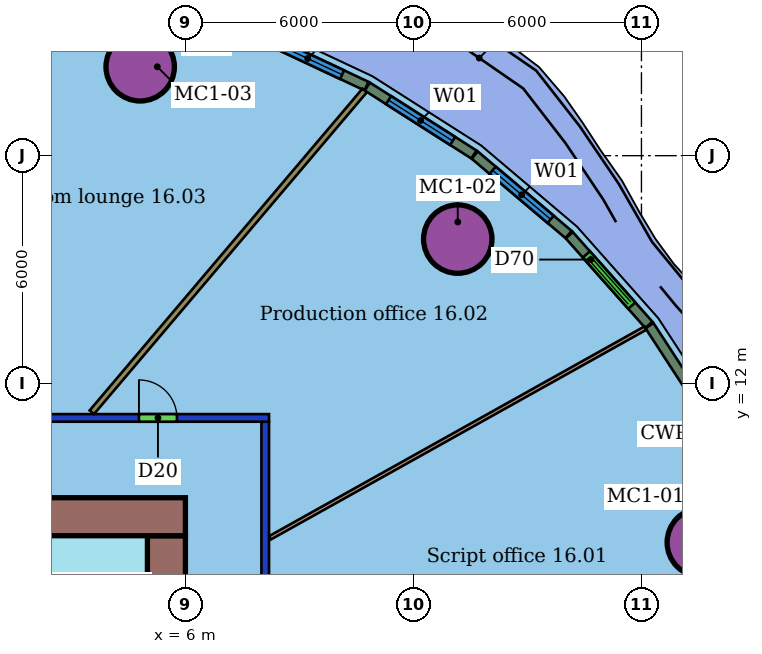
"""IFC4 building model, lengths in metres.
Left out: names, types, materials, properties, quantities, classifications, styles, units other than length and angle.
Written with IfcOpenShell. Run it as: python <this file> out.ifc"""

import sys

from ifc_helpers import new_model, si_unit, direction, frame, frame_2d, origin, origin_2d, place, context, subcontext, project, spatial, rectangle, hollow_circle, extrude, element, fill, save


model = new_model("IFC4")
c1 = context("Model", 3, precision=1e-05, world=origin(), true_north=direction((0.0, 1.0)))
c2 = subcontext(c1, "Body", "Model", "MODEL_VIEW")
j1 = project(units=[si_unit("LENGTHUNIT", "METRE"), si_unit("PLANEANGLEUNIT", "RADIAN")], contexts=[c1])
p1 = place(None, origin())
s1 = spatial("IfcSite", under=j1, at=p1, CompositionType="ELEMENT")
p2 = place(p1, origin())
s2 = spatial("IfcBuilding", under=s1, at=p2, CompositionType="ELEMENT")
p3 = place(p2, frame((0.0, 0.0, 76.7)))
s3 = spatial("IfcBuildingStorey", under=s2, at=p3, CompositionType="ELEMENT", Elevation=76.7)
for number, where, z_axis, x_axis in (
    (1, (19.575, 7.824, 0.0), (0.0, 0.0, 1.0), (1.0, 0.0, 0.0)),
    (2, (13.166, 15.805, 0.0), (0.0, 0.0, 1.0), (1.0, 0.0, 0.0)),
    (3, (4.81, 20.339, 0.0), (0.0, 0.0, 1.0), (1.0, 0.0, 0.0)),
):
    element("IfcColumn", number, at=place(p3, frame(where, z_axis=z_axis, x_axis=x_axis)), inside=s3, PredefinedType="COLUMN", context=c2, shape_type="SweptSolid", body=[
        extrude(hollow_circle(Radius=0.9, WallThickness=0.06, at=origin_2d()), origin(), (0.0, 0.0, 1.0), 3.55),
    ])
p4 = place(p3, frame((-20.2, 11.1, 0.0), z_axis=(0.0, 0.0, 1.0), x_axis=(1.0, 0.0, 0.0)))
e4 = element("IfcWall", 4, at=p4, inside=s3, PredefinedType="PARTITIONING", context=c2, shape_type="SweptSolid", body=[
    extrude(rectangle(XDim=28.4, YDim=0.2, at=frame_2d((14.2, 0.0))), origin(), (0.0, 0.0, 1.0), 2.85),
])
p5 = place(p4, frame((24.977, 0.0, 0.0)))
e5 = element("IfcOpeningElement", 5, at=p5, cuts=e4, PredefinedType="OPENING", context=c2, shape_type="SweptSolid", body=[
    extrude(rectangle(XDim=1.0, YDim=2.1, at=frame_2d((0.5, 1.05))), frame((0.0, 0.11, 0.0), z_axis=(0.0, -1.0, 0.0), x_axis=(1.0, 0.0, 0.0)), (0.0, 0.0, 1.0), 0.22),
])
p6 = place(p4, frame((19.076, 0.0, 0.0)))
e6 = element("IfcOpeningElement", 6, at=p6, cuts=e4, PredefinedType="OPENING", context=c2, shape_type="SweptSolid", body=[
    extrude(rectangle(XDim=1.5, YDim=2.1, at=frame_2d((0.75, 1.05))), frame((0.0, 0.11, 0.0), z_axis=(0.0, -1.0, 0.0), x_axis=(1.0, 0.0, 0.0)), (0.0, 0.0, 1.0), 0.22),
])
p7 = place(p4, frame((15.051, 0.0, 0.0)))
e7 = element("IfcOpeningElement", 7, at=p7, cuts=e4, PredefinedType="OPENING", context=c2, shape_type="SweptSolid", body=[
    extrude(rectangle(XDim=0.9, YDim=2.1, at=frame_2d((0.45, 1.05))), frame((0.0, 0.11, 0.0), z_axis=(0.0, -1.0, 0.0), x_axis=(1.0, 0.0, 0.0)), (0.0, 0.0, 1.0), 0.22),
])
p8 = place(p4, frame((8.231, 0.0, 0.0)))
e8 = element("IfcOpeningElement", 8, at=p8, cuts=e4, PredefinedType="OPENING", context=c2, shape_type="SweptSolid", body=[
    extrude(rectangle(XDim=1.2, YDim=2.1, at=frame_2d((0.6, 1.05))), frame((0.0, 0.11, 0.0), z_axis=(0.0, -1.0, 0.0), x_axis=(1.0, 0.0, 0.0)), (0.0, 0.0, 1.0), 0.22),
])
p9 = place(p3, frame((8.1, 11.0, 0.0), z_axis=(0.0, 0.0, 1.0), x_axis=(0.0, -1.0, 0.0)))
e9 = element("IfcWall", 9, at=p9, inside=s3, PredefinedType="PARTITIONING", context=c2, shape_type="SweptSolid", body=[
    extrude(rectangle(XDim=22.0, YDim=0.2, at=frame_2d((11.0, 0.0))), origin(), (0.0, 0.0, 1.0), 2.85),
])
p10 = place(p9, frame((5.898, 0.0, 0.0)))
e10 = element("IfcOpeningElement", 10, at=p10, cuts=e9, PredefinedType="OPENING", context=c2, shape_type="SweptSolid", body=[
    extrude(rectangle(XDim=1.0, YDim=2.1, at=frame_2d((0.5, 1.05))), frame((0.0, 0.11, 0.0), z_axis=(0.0, -1.0, 0.0), x_axis=(1.0, 0.0, 0.0)), (0.0, 0.0, 1.0), 0.22),
])
p11 = place(p9, frame((16.7, 0.0, 0.0)))
e11 = element("IfcOpeningElement", 11, at=p11, cuts=e9, PredefinedType="OPENING", context=c2, shape_type="SweptSolid", body=[
    extrude(rectangle(XDim=1.5, YDim=2.1, at=frame_2d((0.75, 1.05))), frame((0.0, 0.11, 0.0), z_axis=(0.0, -1.0, 0.0), x_axis=(1.0, 0.0, 0.0)), (0.0, 0.0, 1.0), 0.22),
])
p12 = place(p9, frame((12.749, 0.0, 0.0)))
e12 = element("IfcOpeningElement", 12, at=p12, cuts=e9, PredefinedType="OPENING", context=c2, shape_type="SweptSolid", body=[
    extrude(rectangle(XDim=1.1, YDim=2.1, at=frame_2d((0.55, 1.05))), frame((0.0, 0.11, 0.0), z_axis=(0.0, -1.0, 0.0), x_axis=(1.0, 0.0, 0.0)), (0.0, 0.0, 1.0), 0.22),
])
p13 = place(p9, frame((9.026, 0.0, 0.0)))
e13 = element("IfcOpeningElement", 13, at=p13, cuts=e9, PredefinedType="OPENING", context=c2, shape_type="SweptSolid", body=[
    extrude(rectangle(XDim=1.5, YDim=2.1, at=frame_2d((0.75, 1.05))), frame((0.0, 0.11, 0.0), z_axis=(0.0, -1.0, 0.0), x_axis=(1.0, 0.0, 0.0)), (0.0, 0.0, 1.0), 0.22),
])
p14 = place(p3, frame((18.104, 13.463, 0.0), z_axis=(0.0, 0.0, 1.0), x_axis=(-0.873053971866, -0.4876235866, 0.0)))
e14 = element("IfcWall", 14, at=p14, inside=s3, PredefinedType="PARTITIONING", context=c2, shape_type="SweptSolid", body=[
    extrude(rectangle(XDim=11.317, YDim=0.1, at=frame_2d((5.658, 0.0))), origin(), (0.0, 0.0, 1.0), 3.55),
])
p15 = place(p3, frame((10.716, 19.716, 0.0), z_axis=(0.0, 0.0, 1.0), x_axis=(-0.646692205785, -0.762751067503, 0.0)))
e15 = element("IfcWall", 15, at=p15, inside=s3, PredefinedType="PARTITIONING", context=c2, shape_type="SweptSolid", body=[
    extrude(rectangle(XDim=11.101, YDim=0.15, at=frame_2d((5.55, 0.0))), origin(), (0.0, 0.0, 1.0), 3.55),
])
p16 = place(p3, frame((19.871, 10.978, 0.0), z_axis=(0.0, 0.0, 1.0), x_axis=(-0.545574882471, 0.838062078618, 0.0)))
e16 = element("IfcWall", 16, at=p16, inside=s3, PredefinedType="SOLIDWALL", context=c2, shape_type="SweptSolid", body=[
    extrude(rectangle(XDim=3.042, YDim=0.25, at=frame_2d((1.521, 0.0))), origin(), (0.0, 0.0, 1.0), 3.15),
])
p17 = place(p3, frame((18.195, 13.549, 0.0), z_axis=(0.0, 0.0, 1.0), x_axis=(-0.663940867432, 0.747785079119, 0.0)))
e17 = element("IfcWall", 17, at=p17, inside=s3, PredefinedType="SOLIDWALL", context=c2, shape_type="SweptSolid", body=[
    extrude(rectangle(XDim=3.154, YDim=0.25, at=frame_2d((1.577, 0.0))), origin(), (0.0, 0.0, 1.0), 3.15),
])
p18 = place(p17, frame((0.677, 0.0, 0.0)))
e18 = element("IfcOpeningElement", 18, at=p18, cuts=e17, PredefinedType="OPENING", context=c2, shape_type="SweptSolid", body=[
    extrude(rectangle(XDim=1.8, YDim=2.4, at=frame_2d((0.9, 1.2))), frame((0.0, 0.135, 0.0), z_axis=(0.0, -1.0, 0.0), x_axis=(1.0, 0.0, 0.0)), (0.0, 0.0, 1.0), 0.27),
])
p19 = place(p3, frame((16.083, 15.925, 0.0), z_axis=(0.0, 0.0, 1.0), x_axis=(-0.763314755693, 0.646026767047, 0.0)))
e19 = element("IfcWall", 19, at=p19, inside=s3, PredefinedType="SOLIDWALL", context=c2, shape_type="SweptSolid", body=[
    extrude(rectangle(XDim=3.237, YDim=0.25, at=frame_2d((1.618, 0.0))), origin(), (0.0, 0.0, 1.0), 3.15),
])
p20 = place(p19, frame((0.618, 0.0, 0.8)))
e20 = element("IfcOpeningElement", 20, at=p20, cuts=e19, PredefinedType="OPENING", context=c2, shape_type="SweptSolid", body=[
    extrude(rectangle(XDim=2.0, YDim=2.2, at=frame_2d((1.0, 1.1))), frame((0.0, 0.135, 0.0), z_axis=(0.0, -1.0, 0.0), x_axis=(1.0, 0.0, 0.0)), (0.0, 0.0, 1.0), 0.27),
])
p21 = place(p3, frame((13.592, 18.031, 0.0), z_axis=(0.0, 0.0, 1.0), x_axis=(-0.843428771265, 0.537241014632, 0.0)))
e21 = element("IfcWall", 21, at=p21, inside=s3, PredefinedType="SOLIDWALL", context=c2, shape_type="SweptSolid", body=[
    extrude(rectangle(XDim=3.327, YDim=0.25, at=frame_2d((1.664, 0.0))), origin(), (0.0, 0.0, 1.0), 3.15),
])
p22 = place(p21, frame((0.664, 0.0, 0.8)))
e22 = element("IfcOpeningElement", 22, at=p22, cuts=e21, PredefinedType="OPENING", context=c2, shape_type="SweptSolid", body=[
    extrude(rectangle(XDim=2.0, YDim=2.2, at=frame_2d((1.0, 1.1))), frame((0.0, 0.135, 0.0), z_axis=(0.0, -1.0, 0.0), x_axis=(1.0, 0.0, 0.0)), (0.0, 0.0, 1.0), 0.27),
])
p23 = place(p3, frame((10.765, 19.83, 0.0), z_axis=(0.0, 0.0, 1.0), x_axis=(-0.905237504744, 0.424905942538, 0.0)))
e23 = element("IfcWall", 23, at=p23, inside=s3, PredefinedType="SOLIDWALL", context=c2, shape_type="SweptSolid", body=[
    extrude(rectangle(XDim=3.418, YDim=0.25, at=frame_2d((1.709, 0.0))), origin(), (0.0, 0.0, 1.0), 3.15),
])
p24 = place(p23, frame((0.709, 0.0, 0.8)))
e24 = element("IfcOpeningElement", 24, at=p24, cuts=e23, PredefinedType="OPENING", context=c2, shape_type="SweptSolid", body=[
    extrude(rectangle(XDim=2.0, YDim=2.2, at=frame_2d((1.0, 1.1))), frame((0.0, 0.135, 0.0), z_axis=(0.0, -1.0, 0.0), x_axis=(1.0, 0.0, 0.0)), (0.0, 0.0, 1.0), 0.27),
])
p25 = place(p3, frame((6.0, 8.5, 0.0), z_axis=(0.0, 0.0, 1.0), x_axis=(-1.0, 0.0, 0.0)))
e25 = element("IfcWall", 25, at=p25, inside=s3, PredefinedType="SHEAR", context=c2, shape_type="SweptSolid", body=[
    extrude(rectangle(XDim=12.0, YDim=1.0, at=frame_2d((6.0, 0.0))), origin(), (0.0, 0.0, 1.0), 3.4),
])
p26 = place(p25, frame((5.6, 0.0, 0.0)))
e26 = element("IfcOpeningElement", 26, at=p26, cuts=e25, PredefinedType="OPENING", context=c2, shape_type="SweptSolid", body=[
    extrude(rectangle(XDim=1.2, YDim=2.1, at=frame_2d((0.6, 1.05))), frame((0.0, 0.51, 0.0), z_axis=(0.0, -1.0, 0.0), x_axis=(1.0, 0.0, 0.0)), (0.0, 0.0, 1.0), 1.02),
])
p27 = place(p3, frame((5.5, -8.0, 0.0), z_axis=(0.0, 0.0, 1.0), x_axis=(0.0, 1.0, 0.0)))
e27 = element("IfcWall", 27, at=p27, inside=s3, PredefinedType="SHEAR", context=c2, shape_type="SweptSolid", body=[
    extrude(rectangle(XDim=16.0, YDim=1.0, at=frame_2d((8.0, 0.0))), origin(), (0.0, 0.0, 1.0), 3.4),
])
p28 = place(p27, frame((2.9, 0.0, 0.0)))
e28 = element("IfcOpeningElement", 28, at=p28, cuts=e27, PredefinedType="OPENING", context=c2, shape_type="SweptSolid", body=[
    extrude(rectangle(XDim=1.2, YDim=2.1, at=frame_2d((0.6, 1.05))), frame((0.0, 0.51, 0.0), z_axis=(0.0, -1.0, 0.0), x_axis=(1.0, 0.0, 0.0)), (0.0, 0.0, 1.0), 1.02),
])
p29 = place(p27, frame((11.9, 0.0, 0.0)))
e29 = element("IfcOpeningElement", 29, at=p29, cuts=e27, PredefinedType="OPENING", context=c2, shape_type="SweptSolid", body=[
    extrude(rectangle(XDim=1.2, YDim=2.1, at=frame_2d((0.6, 1.05))), frame((0.0, 0.51, 0.0), z_axis=(0.0, -1.0, 0.0), x_axis=(1.0, 0.0, 0.0)), (0.0, 0.0, 1.0), 1.02),
])
p30 = place(p5, origin())
e30 = element("IfcDoor", 30, at=p30, inside=s3, OperationType="SINGLE_SWING_LEFT", PredefinedType="DOOR", context=c2, shape_type="SweptSolid", body=[
    extrude(rectangle(XDim=1.0, YDim=2.1, at=frame_2d((0.5, 1.05))), frame((0.0, 0.025, 0.0), z_axis=(0.0, -1.0, 0.0), x_axis=(1.0, 0.0, 0.0)), (0.0, 0.0, 1.0), 0.05),
])
fill(e5, e30)
p31 = place(p18, origin())
e31 = element("IfcDoor", 31, at=p31, inside=s3, OperationType="DOUBLE_DOOR_SLIDING", PredefinedType="DOOR", context=c2, shape_type="SweptSolid", body=[
    extrude(rectangle(XDim=1.8, YDim=2.4, at=frame_2d((0.9, 1.2))), frame((0.0, 0.025, 0.0), z_axis=(0.0, -1.0, 0.0), x_axis=(1.0, 0.0, 0.0)), (0.0, 0.0, 1.0), 0.05),
])
fill(e18, e31)
p32 = place(p20, origin())
e32 = element("IfcWindow", 32, at=p32, inside=s3, PartitioningType="SINGLE_PANEL", PredefinedType="WINDOW", context=c2, shape_type="SweptSolid", body=[
    extrude(rectangle(XDim=2.0, YDim=2.2, at=frame_2d((1.0, 1.1))), frame((0.0, 0.03, 0.0), z_axis=(0.0, -1.0, 0.0), x_axis=(1.0, 0.0, 0.0)), (0.0, 0.0, 1.0), 0.06),
])
fill(e20, e32)
p33 = place(p22, origin())
e33 = element("IfcWindow", 33, at=p33, inside=s3, PartitioningType="SINGLE_PANEL", PredefinedType="WINDOW", context=c2, shape_type="SweptSolid", body=[
    extrude(rectangle(XDim=2.0, YDim=2.2, at=frame_2d((1.0, 1.1))), frame((0.0, 0.03, 0.0), z_axis=(0.0, -1.0, 0.0), x_axis=(1.0, 0.0, 0.0)), (0.0, 0.0, 1.0), 0.06),
])
fill(e22, e33)
p34 = place(p24, origin())
e34 = element("IfcWindow", 34, at=p34, inside=s3, PartitioningType="SINGLE_PANEL", PredefinedType="WINDOW", context=c2, shape_type="SweptSolid", body=[
    extrude(rectangle(XDim=2.0, YDim=2.2, at=frame_2d((1.0, 1.1))), frame((0.0, 0.03, 0.0), z_axis=(0.0, -1.0, 0.0), x_axis=(1.0, 0.0, 0.0)), (0.0, 0.0, 1.0), 0.06),
])
fill(e24, e34)
save(model, sys.argv[1])
